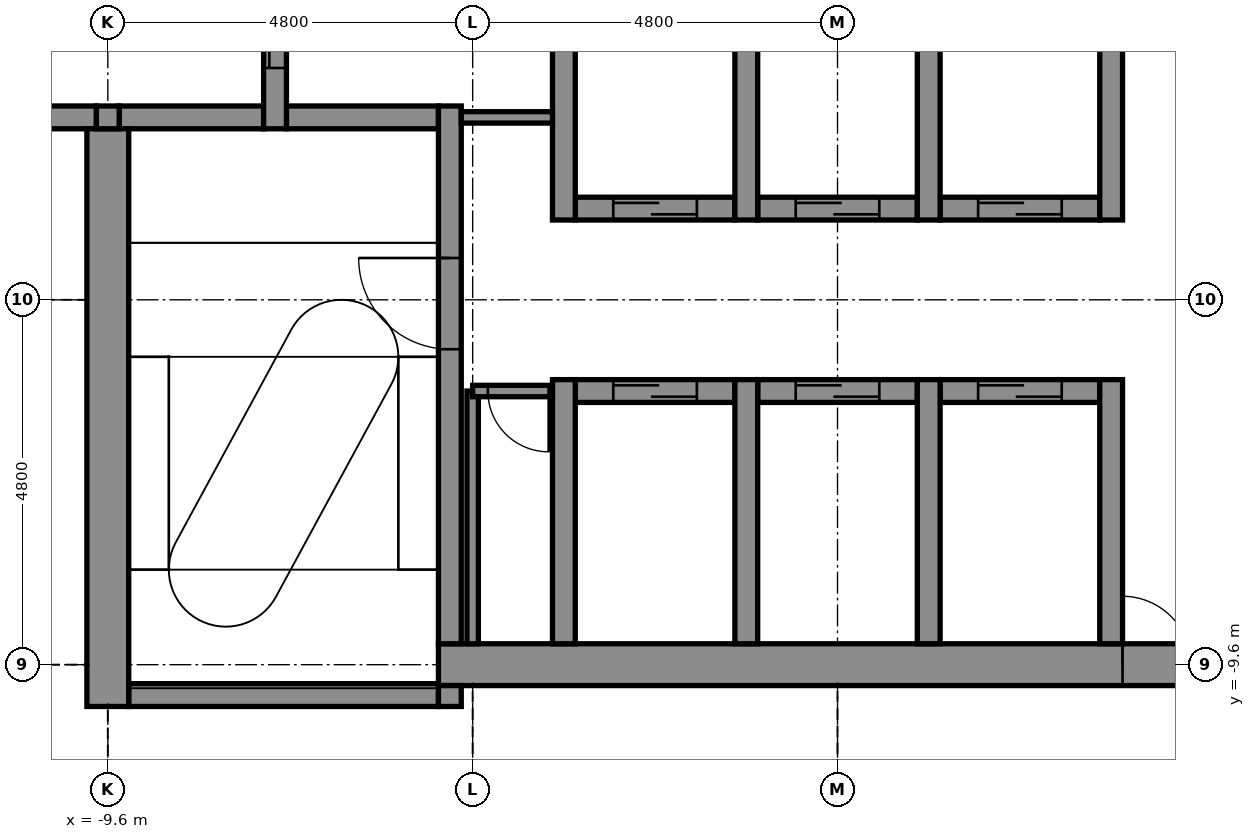
"""IFC4 building model, lengths in metres.
Left out: names, types, materials, properties, quantities, classifications, styles, units other than length and angle.
Written with IfcOpenShell. Run it as: python <this file> out.ifc"""

import sys

from ifc_helpers import new_model, si_unit, direction, frame, frame_2d, origin, place, context, subcontext, project, spatial, rectangle, extrude, element, fill, save


model = new_model("IFC4")
c1 = context("Model", 3, precision=1e-05, world=origin(), true_north=direction((0.0, 1.0)))
c2 = subcontext(c1, "Body", "Model", "MODEL_VIEW")
j1 = project(units=[si_unit("LENGTHUNIT", "METRE"), si_unit("PLANEANGLEUNIT", "RADIAN")], contexts=[c1])
p1 = place(None, origin())
s1 = spatial("IfcSite", under=j1, at=p1, CompositionType="ELEMENT")
p2 = place(p1, origin())
s2 = spatial("IfcBuilding", under=s1, at=p2, CompositionType="ELEMENT")
p3 = place(p2, frame((0.0, 0.0, 226.7)))
s3 = spatial("IfcBuildingStorey", under=s2, at=p3, CompositionType="ELEMENT", Elevation=226.7)
p4 = place(p3, frame((-9.325, -10.0, -0.15), z_axis=(0.0, 0.0, 1.0), x_axis=(1.0, 0.0, 0.0)))
e1 = element("IfcWall", 1, at=p4, inside=s3, PredefinedType="STANDARD", context=c2, shape_type="SweptSolid", body=[
    extrude(rectangle(XDim=4.075, YDim=0.3, at=frame_2d((2.038, 0.0))), origin(), (0.0, 0.0, 1.0), 3.9),
])
p5 = place(p3, frame((-5.25, -9.6, -0.15), z_axis=(0.0, 0.0, 1.0), x_axis=(1.0, 0.0, 0.0)))
e2 = element("IfcWall", 2, at=p5, inside=s3, PredefinedType="SHEAR", context=c2, shape_type="SweptSolid", body=[
    extrude(rectangle(XDim=10.2, YDim=0.55, at=frame_2d((5.1, 0.0))), origin(), (0.0, 0.0, 1.0), 3.9),
])
p6 = place(p5, frame((9.0, 0.0, 0.15)))
e3 = element("IfcOpeningElement", 3, at=p6, cuts=e2, PredefinedType="OPENING", context=c2, shape_type="SweptSolid", body=[
    extrude(rectangle(XDim=0.9, YDim=2.1, at=frame_2d((0.45, 1.05))), frame((0.0, 0.285, 0.0), z_axis=(0.0, -1.0, 0.0), x_axis=(1.0, 0.0, 0.0)), (0.0, 0.0, 1.0), 0.57),
])
p7 = place(p3, frame((-3.45, -6.0, -0.15), z_axis=(0.0, 0.0, 1.0), x_axis=(1.0, 0.0, 0.0)))
e4 = element("IfcWall", 4, at=p7, inside=s3, PredefinedType="STANDARD", context=c2, shape_type="SweptSolid", body=[
    extrude(rectangle(XDim=2.1, YDim=0.3, at=frame_2d((1.05, 0.0))), origin(), (0.0, 0.0, 1.0), 3.9),
])
p8 = place(p7, frame((0.5, 0.0, 0.15)))
e5 = element("IfcOpeningElement", 5, at=p8, cuts=e4, PredefinedType="OPENING", context=c2, shape_type="SweptSolid", body=[
    extrude(rectangle(XDim=1.1, YDim=2.1, at=frame_2d((0.55, 1.05))), frame((0.0, 0.16, 0.0), z_axis=(0.0, -1.0, 0.0), x_axis=(1.0, 0.0, 0.0)), (0.0, 0.0, 1.0), 0.32),
])
p9 = place(p3, frame((-1.05, -6.0, -0.15), z_axis=(0.0, 0.0, 1.0), x_axis=(1.0, 0.0, 0.0)))
e6 = element("IfcWall", 6, at=p9, inside=s3, PredefinedType="STANDARD", context=c2, shape_type="SweptSolid", body=[
    extrude(rectangle(XDim=2.1, YDim=0.3, at=frame_2d((1.05, 0.0))), origin(), (0.0, 0.0, 1.0), 3.9),
])
p10 = place(p9, frame((0.5, 0.0, 0.15)))
e7 = element("IfcOpeningElement", 7, at=p10, cuts=e6, PredefinedType="OPENING", context=c2, shape_type="SweptSolid", body=[
    extrude(rectangle(XDim=1.1, YDim=2.1, at=frame_2d((0.55, 1.05))), frame((0.0, 0.16, 0.0), z_axis=(0.0, -1.0, 0.0), x_axis=(1.0, 0.0, 0.0)), (0.0, 0.0, 1.0), 0.32),
])
p11 = place(p3, frame((1.35, -6.0, -0.15), z_axis=(0.0, 0.0, 1.0), x_axis=(1.0, 0.0, 0.0)))
e8 = element("IfcWall", 8, at=p11, inside=s3, PredefinedType="STANDARD", context=c2, shape_type="SweptSolid", body=[
    extrude(rectangle(XDim=2.1, YDim=0.3, at=frame_2d((1.05, 0.0))), origin(), (0.0, 0.0, 1.0), 3.9),
])
p12 = place(p11, frame((0.5, 0.0, 0.15)))
e9 = element("IfcOpeningElement", 9, at=p12, cuts=e8, PredefinedType="OPENING", context=c2, shape_type="SweptSolid", body=[
    extrude(rectangle(XDim=1.1, YDim=2.1, at=frame_2d((0.55, 1.05))), frame((0.0, 0.16, 0.0), z_axis=(0.0, -1.0, 0.0), x_axis=(1.0, 0.0, 0.0)), (0.0, 0.0, 1.0), 0.32),
])
p13 = place(p3, frame((-3.45, -3.6, -0.15), z_axis=(0.0, 0.0, 1.0), x_axis=(1.0, 0.0, 0.0)))
e10 = element("IfcWall", 10, at=p13, inside=s3, PredefinedType="STANDARD", context=c2, shape_type="SweptSolid", body=[
    extrude(rectangle(XDim=2.1, YDim=0.3, at=frame_2d((1.05, 0.0))), origin(), (0.0, 0.0, 1.0), 3.9),
])
p14 = place(p13, frame((0.5, 0.0, 0.15)))
e11 = element("IfcOpeningElement", 11, at=p14, cuts=e10, PredefinedType="OPENING", context=c2, shape_type="SweptSolid", body=[
    extrude(rectangle(XDim=1.1, YDim=2.1, at=frame_2d((0.55, 1.05))), frame((0.0, 0.16, 0.0), z_axis=(0.0, -1.0, 0.0), x_axis=(1.0, 0.0, 0.0)), (0.0, 0.0, 1.0), 0.32),
])
p15 = place(p3, frame((-1.05, -3.6, -0.15), z_axis=(0.0, 0.0, 1.0), x_axis=(1.0, 0.0, 0.0)))
e12 = element("IfcWall", 12, at=p15, inside=s3, PredefinedType="STANDARD", context=c2, shape_type="SweptSolid", body=[
    extrude(rectangle(XDim=2.1, YDim=0.3, at=frame_2d((1.05, 0.0))), origin(), (0.0, 0.0, 1.0), 3.9),
])
p16 = place(p15, frame((0.5, 0.0, 0.15)))
e13 = element("IfcOpeningElement", 13, at=p16, cuts=e12, PredefinedType="OPENING", context=c2, shape_type="SweptSolid", body=[
    extrude(rectangle(XDim=1.1, YDim=2.1, at=frame_2d((0.55, 1.05))), frame((0.0, 0.16, 0.0), z_axis=(0.0, -1.0, 0.0), x_axis=(1.0, 0.0, 0.0)), (0.0, 0.0, 1.0), 0.32),
])
p17 = place(p3, frame((1.35, -3.6, -0.15), z_axis=(0.0, 0.0, 1.0), x_axis=(1.0, 0.0, 0.0)))
e14 = element("IfcWall", 14, at=p17, inside=s3, PredefinedType="STANDARD", context=c2, shape_type="SweptSolid", body=[
    extrude(rectangle(XDim=2.1, YDim=0.3, at=frame_2d((1.05, 0.0))), origin(), (0.0, 0.0, 1.0), 3.9),
])
p18 = place(p17, frame((0.5, 0.0, 0.15)))
e15 = element("IfcOpeningElement", 15, at=p18, cuts=e14, PredefinedType="OPENING", context=c2, shape_type="SweptSolid", body=[
    extrude(rectangle(XDim=1.1, YDim=2.1, at=frame_2d((0.55, 1.05))), frame((0.0, 0.16, 0.0), z_axis=(0.0, -1.0, 0.0), x_axis=(1.0, 0.0, 0.0)), (0.0, 0.0, 1.0), 0.32),
])
p19 = place(p3, frame((-10.85, -2.4, -0.15), z_axis=(0.0, 0.0, 1.0), x_axis=(1.0, 0.0, 0.0)))
e16 = element("IfcWall", 16, at=p19, inside=s3, PredefinedType="STANDARD", context=c2, shape_type="SweptSolid", body=[
    extrude(rectangle(XDim=1.1, YDim=0.3, at=frame_2d((0.55, 0.0))), origin(), (0.0, 0.0, 1.0), 3.9),
])
p20 = place(p3, frame((-9.45, -2.4, -0.15), z_axis=(0.0, 0.0, 1.0), x_axis=(1.0, 0.0, 0.0)))
e17 = element("IfcWall", 17, at=p20, inside=s3, PredefinedType="STANDARD", context=c2, shape_type="SweptSolid", body=[
    extrude(rectangle(XDim=1.9, YDim=0.3, at=frame_2d((0.95, 0.0))), origin(), (0.0, 0.0, 1.0), 3.9),
])
p21 = place(p3, frame((-7.25, -2.4, -0.15), z_axis=(0.0, 0.0, 1.0), x_axis=(1.0, 0.0, 0.0)))
e18 = element("IfcWall", 18, at=p21, inside=s3, PredefinedType="STANDARD", context=c2, shape_type="SweptSolid", body=[
    extrude(rectangle(XDim=2.0, YDim=0.3, at=frame_2d((1.0, 0.0))), origin(), (0.0, 0.0, 1.0), 3.9),
])
p22 = place(p3, frame((-9.6, -10.15, -0.15), z_axis=(0.0, 0.0, 1.0), x_axis=(0.0, 1.0, 0.0)))
e19 = element("IfcWall", 19, at=p22, inside=s3, PredefinedType="SHEAR", context=c2, shape_type="SweptSolid", body=[
    extrude(rectangle(XDim=7.6, YDim=0.55, at=frame_2d((3.8, 0.0))), origin(), (0.0, 0.0, 1.0), 3.9),
])
p23 = place(p3, frame((-9.6, -2.55, -0.15), z_axis=(0.0, 0.0, 1.0), x_axis=(0.0, 1.0, 0.0)))
e20 = element("IfcWall", 20, at=p23, inside=s3, PredefinedType="STANDARD", context=c2, shape_type="SweptSolid", body=[
    extrude(rectangle(XDim=0.3, YDim=0.3, at=frame_2d((0.15, 0.0))), origin(), (0.0, 0.0, 1.0), 3.9),
])
p24 = place(p3, frame((-7.4, -2.55, -0.15), z_axis=(0.0, 0.0, 1.0), x_axis=(0.0, 1.0, 0.0)))
e21 = element("IfcWall", 21, at=p24, inside=s3, PredefinedType="STANDARD", context=c2, shape_type="SweptSolid", body=[
    extrude(rectangle(XDim=5.1, YDim=0.3, at=frame_2d((2.55, 0.0))), origin(), (0.0, 0.0, 1.0), 3.9),
])
p25 = place(p24, frame((0.8, 0.0, 0.15)))
e22 = element("IfcOpeningElement", 22, at=p25, cuts=e21, PredefinedType="OPENING", context=c2, shape_type="SweptSolid", body=[
    extrude(rectangle(XDim=1.1, YDim=2.1, at=frame_2d((0.55, 1.05))), frame((0.0, 0.16, 0.0), z_axis=(0.0, -1.0, 0.0), x_axis=(1.0, 0.0, 0.0)), (0.0, 0.0, 1.0), 0.32),
])
p26 = place(p24, frame((3.2, 0.0, 0.15)))
e23 = element("IfcOpeningElement", 23, at=p26, cuts=e21, PredefinedType="OPENING", context=c2, shape_type="SweptSolid", body=[
    extrude(rectangle(XDim=1.1, YDim=2.1, at=frame_2d((0.55, 1.05))), frame((0.0, 0.16, 0.0), z_axis=(0.0, -1.0, 0.0), x_axis=(1.0, 0.0, 0.0)), (0.0, 0.0, 1.0), 0.32),
])
p27 = place(p3, frame((-5.1, -10.15, -0.15), z_axis=(0.0, 0.0, 1.0), x_axis=(0.0, 1.0, 0.0)))
e24 = element("IfcWall", 24, at=p27, inside=s3, PredefinedType="STANDARD", context=c2, shape_type="SweptSolid", body=[
    extrude(rectangle(XDim=0.275, YDim=0.3, at=frame_2d((0.137, 0.0))), origin(), (0.0, 0.0, 1.0), 3.9),
])
p28 = place(p3, frame((-5.1, -9.325, -0.15), z_axis=(0.0, 0.0, 1.0), x_axis=(0.0, 1.0, 0.0)))
e25 = element("IfcWall", 25, at=p28, inside=s3, PredefinedType="STANDARD", context=c2, shape_type="SweptSolid", body=[
    extrude(rectangle(XDim=7.075, YDim=0.3, at=frame_2d((3.538, 0.0))), origin(), (0.0, 0.0, 1.0), 3.9),
])
p29 = place(p28, frame((3.875, 0.0, 0.15)))
e26 = element("IfcOpeningElement", 26, at=p29, cuts=e25, PredefinedType="OPENING", context=c2, shape_type="SweptSolid", body=[
    extrude(rectangle(XDim=1.2, YDim=2.1, at=frame_2d((0.6, 1.05))), frame((0.0, 0.16, 0.0), z_axis=(0.0, -1.0, 0.0), x_axis=(1.0, 0.0, 0.0)), (0.0, 0.0, 1.0), 0.32),
])
p30 = place(p3, frame((-3.6, -9.325, -0.15), z_axis=(0.0, 0.0, 1.0), x_axis=(0.0, 1.0, 0.0)))
e27 = element("IfcWall", 27, at=p30, inside=s3, PredefinedType="STANDARD", context=c2, shape_type="SweptSolid", body=[
    extrude(rectangle(XDim=3.475, YDim=0.3, at=frame_2d((1.737, 0.0))), origin(), (0.0, 0.0, 1.0), 3.9),
])
p31 = place(p3, frame((-3.6, -3.75, -0.15), z_axis=(0.0, 0.0, 1.0), x_axis=(0.0, 1.0, 0.0)))
e28 = element("IfcWall", 28, at=p31, inside=s3, PredefinedType="STANDARD", context=c2, shape_type="SweptSolid", body=[
    extrude(rectangle(XDim=7.5, YDim=0.3, at=frame_2d((3.75, 0.0))), origin(), (0.0, 0.0, 1.0), 3.9),
])
p32 = place(p3, frame((-1.2, -9.325, -0.15), z_axis=(0.0, 0.0, 1.0), x_axis=(0.0, 1.0, 0.0)))
e29 = element("IfcWall", 29, at=p32, inside=s3, PredefinedType="STANDARD", context=c2, shape_type="SweptSolid", body=[
    extrude(rectangle(XDim=3.475, YDim=0.3, at=frame_2d((1.737, 0.0))), origin(), (0.0, 0.0, 1.0), 3.9),
])
p33 = place(p3, frame((-1.2, -3.75, -0.15), z_axis=(0.0, 0.0, 1.0), x_axis=(0.0, 1.0, 0.0)))
e30 = element("IfcWall", 30, at=p33, inside=s3, PredefinedType="STANDARD", context=c2, shape_type="SweptSolid", body=[
    extrude(rectangle(XDim=7.5, YDim=0.3, at=frame_2d((3.75, 0.0))), origin(), (0.0, 0.0, 1.0), 3.9),
])
p34 = place(p3, frame((1.2, -9.325, -0.15), z_axis=(0.0, 0.0, 1.0), x_axis=(0.0, 1.0, 0.0)))
e31 = element("IfcWall", 31, at=p34, inside=s3, PredefinedType="STANDARD", context=c2, shape_type="SweptSolid", body=[
    extrude(rectangle(XDim=3.475, YDim=0.3, at=frame_2d((1.737, 0.0))), origin(), (0.0, 0.0, 1.0), 3.9),
])
p35 = place(p3, frame((1.2, -3.75, -0.15), z_axis=(0.0, 0.0, 1.0), x_axis=(0.0, 1.0, 0.0)))
e32 = element("IfcWall", 32, at=p35, inside=s3, PredefinedType="STANDARD", context=c2, shape_type="SweptSolid", body=[
    extrude(rectangle(XDim=7.5, YDim=0.3, at=frame_2d((3.75, 0.0))), origin(), (0.0, 0.0, 1.0), 3.9),
])
p36 = place(p3, frame((3.6, -9.325, -0.15), z_axis=(0.0, 0.0, 1.0), x_axis=(0.0, 1.0, 0.0)))
e33 = element("IfcWall", 33, at=p36, inside=s3, PredefinedType="STANDARD", context=c2, shape_type="SweptSolid", body=[
    extrude(rectangle(XDim=3.475, YDim=0.3, at=frame_2d((1.737, 0.0))), origin(), (0.0, 0.0, 1.0), 3.9),
])
p37 = place(p3, frame((3.6, -3.75, -0.15), z_axis=(0.0, 0.0, 1.0), x_axis=(0.0, 1.0, 0.0)))
e34 = element("IfcWall", 34, at=p37, inside=s3, PredefinedType="STANDARD", context=c2, shape_type="SweptSolid", body=[
    extrude(rectangle(XDim=7.5, YDim=0.3, at=frame_2d((3.75, 0.0))), origin(), (0.0, 0.0, 1.0), 3.9),
])
p38 = place(p3, frame((-4.8, -9.325, 0.0), z_axis=(0.0, 0.0, 1.0), x_axis=(0.0, 1.0, 0.0)))
e35 = element("IfcWall", 35, at=p38, inside=s3, PredefinedType="PARTITIONING", context=c2, shape_type="SweptSolid", body=[
    extrude(rectangle(XDim=3.325, YDim=0.15, at=frame_2d((1.663, 0.0))), origin(), (0.0, 0.0, 1.0), 3.75),
])
p39 = place(p3, frame((-4.8, -6.0, 0.0), z_axis=(0.0, 0.0, 1.0), x_axis=(1.0, 0.0, 0.0)))
e36 = element("IfcWall", 36, at=p39, inside=s3, PredefinedType="PARTITIONING", context=c2, shape_type="SweptSolid", body=[
    extrude(rectangle(XDim=1.05, YDim=0.15, at=frame_2d((0.525, 0.0))), origin(), (0.0, 0.0, 1.0), 3.75),
])
p40 = place(p39, frame((0.2, 0.0, 0.0)))
e37 = element("IfcOpeningElement", 37, at=p40, cuts=e36, PredefinedType="OPENING", context=c2, shape_type="SweptSolid", body=[
    extrude(rectangle(XDim=0.8, YDim=2.1, at=frame_2d((0.4, 1.05))), frame((0.0, 0.085, 0.0), z_axis=(0.0, -1.0, 0.0), x_axis=(1.0, 0.0, 0.0)), (0.0, 0.0, 1.0), 0.17),
])
p41 = place(p3, frame((-4.95, -2.4, 0.0), z_axis=(0.0, 0.0, 1.0), x_axis=(1.0, 0.0, 0.0)))
e38 = element("IfcWall", 38, at=p41, inside=s3, PredefinedType="PARTITIONING", context=c2, shape_type="SweptSolid", body=[
    extrude(rectangle(XDim=1.2, YDim=0.15, at=frame_2d((0.6, 0.0))), origin(), (0.0, 0.0, 1.0), 3.75),
])
p42 = place(p40, frame((0.8, 0.0, 0.0), z_axis=(0.0, 0.0, 1.0), x_axis=(-1.0, 0.0, 0.0)))
e39 = element("IfcDoor", 39, at=p42, inside=s3, OperationType="SINGLE_SWING_RIGHT", PredefinedType="DOOR", context=c2, shape_type="SweptSolid", body=[
    extrude(rectangle(XDim=0.8, YDim=2.1, at=frame_2d((0.4, 1.05))), frame((0.0, 0.025, 0.0), z_axis=(0.0, -1.0, 0.0), x_axis=(1.0, 0.0, 0.0)), (0.0, 0.0, 1.0), 0.05),
])
fill(e37, e39)
p43 = place(p25, origin())
e40 = element("IfcDoor", 40, at=p43, inside=s3, OperationType="DOUBLE_DOOR_SLIDING", PredefinedType="DOOR", context=c2, shape_type="SweptSolid", body=[
    extrude(rectangle(XDim=1.1, YDim=2.1, at=frame_2d((0.55, 1.05))), frame((0.0, 0.025, 0.0), z_axis=(0.0, -1.0, 0.0), x_axis=(1.0, 0.0, 0.0)), (0.0, 0.0, 1.0), 0.05),
])
fill(e22, e40)
p44 = place(p14, origin())
e41 = element("IfcDoor", 41, at=p44, inside=s3, OperationType="DOUBLE_DOOR_SLIDING", PredefinedType="DOOR", context=c2, shape_type="SweptSolid", body=[
    extrude(rectangle(XDim=1.1, YDim=2.1, at=frame_2d((0.55, 1.05))), frame((0.0, 0.025, 0.0), z_axis=(0.0, -1.0, 0.0), x_axis=(1.0, 0.0, 0.0)), (0.0, 0.0, 1.0), 0.05),
])
fill(e11, e41)
p45 = place(p16, origin())
e42 = element("IfcDoor", 42, at=p45, inside=s3, OperationType="DOUBLE_DOOR_SLIDING", PredefinedType="DOOR", context=c2, shape_type="SweptSolid", body=[
    extrude(rectangle(XDim=1.1, YDim=2.1, at=frame_2d((0.55, 1.05))), frame((0.0, 0.025, 0.0), z_axis=(0.0, -1.0, 0.0), x_axis=(1.0, 0.0, 0.0)), (0.0, 0.0, 1.0), 0.05),
])
fill(e13, e42)
p46 = place(p18, origin())
e43 = element("IfcDoor", 43, at=p46, inside=s3, OperationType="DOUBLE_DOOR_SLIDING", PredefinedType="DOOR", context=c2, shape_type="SweptSolid", body=[
    extrude(rectangle(XDim=1.1, YDim=2.1, at=frame_2d((0.55, 1.05))), frame((0.0, 0.025, 0.0), z_axis=(0.0, -1.0, 0.0), x_axis=(1.0, 0.0, 0.0)), (0.0, 0.0, 1.0), 0.05),
])
fill(e15, e43)
p47 = place(p8, origin())
e44 = element("IfcDoor", 44, at=p47, inside=s3, OperationType="DOUBLE_DOOR_SLIDING", PredefinedType="DOOR", context=c2, shape_type="SweptSolid", body=[
    extrude(rectangle(XDim=1.1, YDim=2.1, at=frame_2d((0.55, 1.05))), frame((0.0, 0.025, 0.0), z_axis=(0.0, -1.0, 0.0), x_axis=(1.0, 0.0, 0.0)), (0.0, 0.0, 1.0), 0.05),
])
fill(e5, e44)
p48 = place(p10, origin())
e45 = element("IfcDoor", 45, at=p48, inside=s3, OperationType="DOUBLE_DOOR_SLIDING", PredefinedType="DOOR", context=c2, shape_type="SweptSolid", body=[
    extrude(rectangle(XDim=1.1, YDim=2.1, at=frame_2d((0.55, 1.05))), frame((0.0, 0.025, 0.0), z_axis=(0.0, -1.0, 0.0), x_axis=(1.0, 0.0, 0.0)), (0.0, 0.0, 1.0), 0.05),
])
fill(e7, e45)
p49 = place(p12, origin())
e46 = element("IfcDoor", 46, at=p49, inside=s3, OperationType="DOUBLE_DOOR_SLIDING", PredefinedType="DOOR", context=c2, shape_type="SweptSolid", body=[
    extrude(rectangle(XDim=1.1, YDim=2.1, at=frame_2d((0.55, 1.05))), frame((0.0, 0.025, 0.0), z_axis=(0.0, -1.0, 0.0), x_axis=(1.0, 0.0, 0.0)), (0.0, 0.0, 1.0), 0.05),
])
fill(e9, e46)
p50 = place(p29, origin())
e47 = element("IfcDoor", 47, at=p50, inside=s3, OperationType="SINGLE_SWING_RIGHT", PredefinedType="DOOR", context=c2, shape_type="SweptSolid", body=[
    extrude(rectangle(XDim=1.2, YDim=2.1, at=frame_2d((0.6, 1.05))), frame((0.0, 0.025, 0.0), z_axis=(0.0, -1.0, 0.0), x_axis=(1.0, 0.0, 0.0)), (0.0, 0.0, 1.0), 0.05),
])
fill(e26, e47)
p51 = place(p6, origin())
e48 = element("IfcDoor", 48, at=p51, inside=s3, OperationType="SINGLE_SWING_LEFT", PredefinedType="DOOR", context=c2, shape_type="SweptSolid", body=[
    extrude(rectangle(XDim=0.9, YDim=2.1, at=frame_2d((0.45, 1.05))), frame((0.0, 0.025, 0.0), z_axis=(0.0, -1.0, 0.0), x_axis=(1.0, 0.0, 0.0)), (0.0, 0.0, 1.0), 0.05),
])
fill(e3, e48)
save(model, sys.argv[1])
